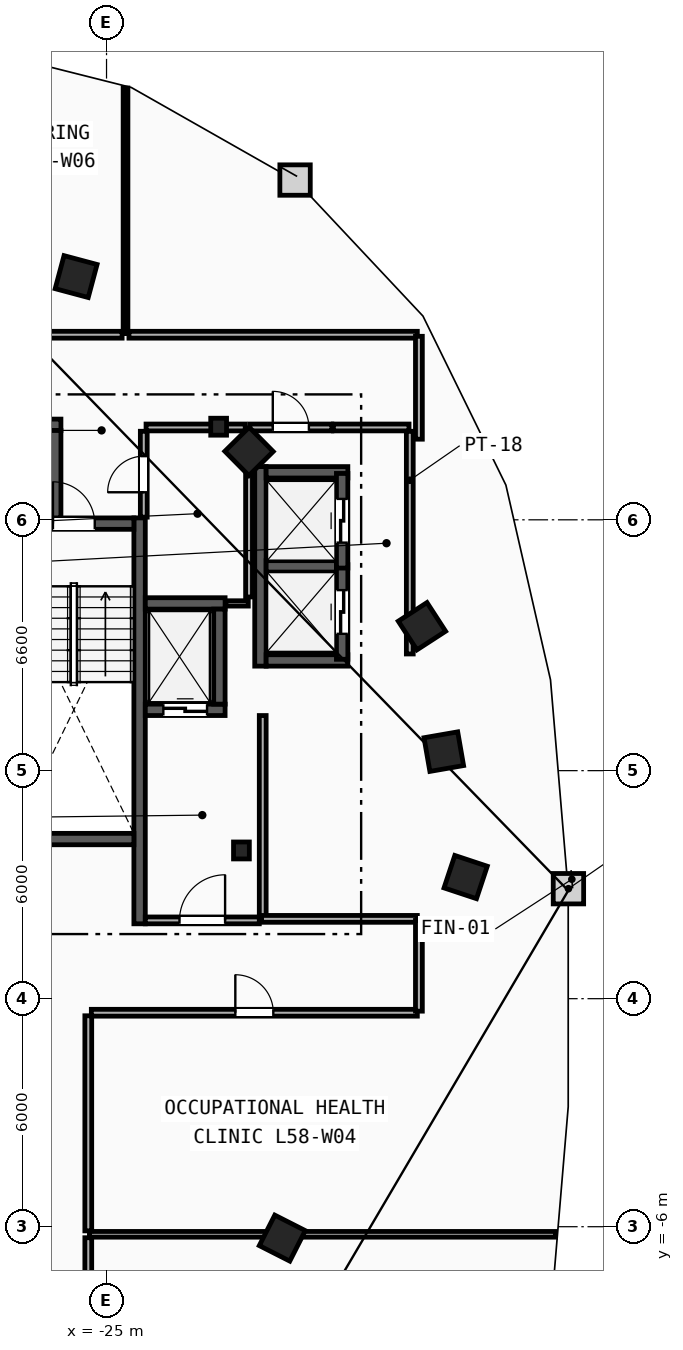
"""IFC4 building model, lengths in metres.
Left out: names, types, materials, properties, quantities, classifications, styles, units other than length and angle.
Written with IfcOpenShell. Run it as: python <this file> out.ifc"""

import sys

from ifc_helpers import new_model, si_unit, direction, frame, frame_2d, origin, origin_2d, place, context, subcontext, project, spatial, rectangle, i_section, extrude, element, fill, save


model = new_model("IFC4")
c1 = context("Model", 3, precision=1e-05, world=origin(), true_north=direction((0.0, 1.0)))
c2 = subcontext(c1, "Body", "Model", "MODEL_VIEW")
j1 = project(units=[si_unit("LENGTHUNIT", "METRE"), si_unit("PLANEANGLEUNIT", "RADIAN")], contexts=[c1])
p1 = place(None, origin())
s1 = spatial("IfcSite", under=j1, at=p1, CompositionType="ELEMENT")
p2 = place(p1, origin())
s2 = spatial("IfcBuilding", under=s1, at=p2, CompositionType="ELEMENT")
p3 = place(p2, frame((0.0, 0.0, 220.6)))
s3 = spatial("IfcBuildingStorey", under=s2, at=p3, CompositionType="ELEMENT", Elevation=220.6)
for number, where, z_axis, x_axis in (
    (1, (-21.45, 3.9, 0.0), (0.0, 0.0, 1.0), (1.0, 0.0, 0.0)),
    (2, (-22.05, 15.05, 0.0), (0.0, 0.0, 1.0), (1.0, 0.0, 0.0)),
):
    element("IfcColumn", number, at=place(p3, frame(where, z_axis=z_axis, x_axis=x_axis)), inside=s3, PredefinedType="COLUMN", context=c2, shape_type="SweptSolid", body=[
        extrude(i_section(OverallWidth=0.416, OverallDepth=0.446, WebThickness=0.039, FlangeThickness=0.063, FilletRadius=0.018, at=origin_2d()), origin(), (0.0, 0.0, 1.0), 3.6),
    ])
for number, where, z_axis, x_axis in (
    (3, (-15.55, 3.2, 0.0), (0.0, 0.0, 1.0), (0.315, 0.949, 0.0)),
    (4, (-16.125, 6.5, 0.0), (0.0, 0.0, 1.0), (-0.172, 0.985, 0.0)),
    (5, (-16.7, 9.8, 0.0), (0.0, 0.0, 1.0), (-0.544, 0.839, 0.0)),
    (6, (-21.25, 14.4, 0.0), (0.0, 0.0, 1.0), (-0.703, 0.711, 0.0)),
    (7, (-25.8, 19.0, 0.0), (0.0, 0.0, 1.0), (-0.966, 0.259, 0.0)),
    (8, (-20.375, -6.3, 0.0), (0.0, 0.0, 1.0), (0.453, 0.892, 0.0)),
):
    element("IfcColumn", number, at=place(p3, frame(where, z_axis=z_axis, x_axis=x_axis)), inside=s3, PredefinedType="COLUMN", context=c2, shape_type="SweptSolid", body=[
        extrude(rectangle(XDim=0.9, YDim=0.9, at=origin_2d()), origin(), (0.0, 0.0, 1.0), 3.6),
    ])
p4 = place(p3, frame((-24.13, 1.97, 0.0), z_axis=(0.0, 0.0, 1.0), x_axis=(0.0, 1.0, 0.0)))
e9 = element("IfcWall", 9, at=p4, inside=s3, PredefinedType="SHEAR", context=c2, shape_type="SweptSolid", body=[
    extrude(rectangle(XDim=10.68, YDim=0.3, at=frame_2d((5.34, 0.0))), origin(), (0.0, 0.0, 1.0), 3.34),
])
p5 = place(p3, frame((-27.44, 12.5, 0.0), z_axis=(0.0, 0.0, 1.0), x_axis=(1.0, 0.0, 0.0)))
e10 = element("IfcWall", 10, at=p5, inside=s3, PredefinedType="SHEAR", context=c2, shape_type="SweptSolid", body=[
    extrude(rectangle(XDim=3.16, YDim=0.3, at=frame_2d((1.58, 0.0))), origin(), (0.0, 0.0, 1.0), 3.34),
])
p6 = place(p5, frame((1.03, 0.0, 0.0)))
e11 = element("IfcOpeningElement", 11, at=p6, cuts=e10, PredefinedType="OPENING", context=c2, shape_type="SweptSolid", body=[
    extrude(rectangle(XDim=1.1, YDim=2.15, at=frame_2d((0.55, 1.075))), frame((0.0, 0.16, 0.0), z_axis=(0.0, -1.0, 0.0), x_axis=(1.0, 0.0, 0.0)), (0.0, 0.0, 1.0), 0.32),
])
p7 = place(p3, frame((-27.44, 4.2, 0.0), z_axis=(0.0, 0.0, 1.0), x_axis=(1.0, 0.0, 0.0)))
e12 = element("IfcWall", 12, at=p7, inside=s3, PredefinedType="SHEAR", context=c2, shape_type="SweptSolid", body=[
    extrude(rectangle(XDim=3.16, YDim=0.3, at=frame_2d((1.58, 0.0))), origin(), (0.0, 0.0, 1.0), 3.34),
])
p8 = place(p3, frame((-20.89, 2.15, 0.0), z_axis=(0.0, 0.0, 1.0), x_axis=(0.0, 1.0, 0.0)))
e13 = element("IfcWall", 13, at=p8, inside=s3, PredefinedType="PARTITIONING", context=c2, shape_type="SweptSolid", body=[
    extrude(rectangle(XDim=5.3, YDim=0.18, at=frame_2d((2.65, 0.0))), origin(), (0.0, 0.0, 1.0), 3.34),
])
p9 = place(p3, frame((-23.98, 2.06, 0.0), z_axis=(0.0, 0.0, 1.0), x_axis=(1.0, 0.0, 0.0)))
e14 = element("IfcWall", 14, at=p9, inside=s3, PredefinedType="PARTITIONING", context=c2, shape_type="SweptSolid", body=[
    extrude(rectangle(XDim=3.0, YDim=0.18, at=frame_2d((1.5, 0.0))), origin(), (0.0, 0.0, 1.0), 3.34),
])
p10 = place(p9, frame((0.9, 0.0, 0.0)))
e15 = element("IfcOpeningElement", 15, at=p10, cuts=e14, PredefinedType="OPENING", context=c2, shape_type="SweptSolid", body=[
    extrude(rectangle(XDim=1.2, YDim=2.15, at=frame_2d((0.6, 1.075))), frame((0.0, 0.1, 0.0), z_axis=(0.0, -1.0, 0.0), x_axis=(1.0, 0.0, 0.0)), (0.0, 0.0, 1.0), 0.2),
])
p11 = place(p3, frame((-23.98, 7.6, 0.0), z_axis=(0.0, 0.0, 1.0), x_axis=(1.0, 0.0, 0.0)))
e16 = element("IfcWall", 16, at=p11, inside=s3, PredefinedType="SHEAR", context=c2, shape_type="SweptSolid", body=[
    extrude(rectangle(XDim=2.1, YDim=0.3, at=frame_2d((1.05, 0.0))), origin(), (0.0, 0.0, 1.0), 3.34),
])
p12 = place(p11, frame((0.475, 0.0, 0.0)))
e17 = element("IfcOpeningElement", 17, at=p12, cuts=e16, PredefinedType="OPENING", context=c2, shape_type="SweptSolid", body=[
    extrude(rectangle(XDim=1.15, YDim=2.2, at=frame_2d((0.575, 1.1))), frame((0.0, 0.16, 0.0), z_axis=(0.0, -1.0, 0.0), x_axis=(1.0, 0.0, 0.0)), (0.0, 0.0, 1.0), 0.32),
])
p13 = place(p3, frame((-23.98, 10.4, 0.0), z_axis=(0.0, 0.0, 1.0), x_axis=(1.0, 0.0, 0.0)))
e18 = element("IfcWall", 18, at=p13, inside=s3, PredefinedType="SHEAR", context=c2, shape_type="SweptSolid", body=[
    extrude(rectangle(XDim=2.1, YDim=0.3, at=frame_2d((1.05, 0.0))), origin(), (0.0, 0.0, 1.0), 3.34),
])
for number, where, z_axis, x_axis in (
    (19, (-22.03, 7.75, 0.0), (0.0, 0.0, 1.0), (0.0, 1.0, 0.0)),
    (20, (-28.7, 15.1, 0.0), (0.0, 0.0, 1.0), (1.0, 0.0, 0.0)),
):
    element("IfcWall", number, at=place(p3, frame(where, z_axis=z_axis, x_axis=x_axis)), inside=s3, PredefinedType="SHEAR", context=c2, shape_type="SweptSolid", body=[
        extrude(rectangle(XDim=2.5, YDim=0.3, at=frame_2d((1.25, 0.0))), origin(), (0.0, 0.0, 1.0), 3.34),
    ])
p14 = place(p3, frame((-26.35, 12.65, 0.0), z_axis=(0.0, 0.0, 1.0), x_axis=(0.0, 1.0, 0.0)))
e21 = element("IfcWall", 21, at=p14, inside=s3, PredefinedType="SHEAR", context=c2, shape_type="SweptSolid", body=[
    extrude(rectangle(XDim=2.3, YDim=0.3, at=frame_2d((1.15, 0.0))), origin(), (0.0, 0.0, 1.0), 3.34),
])
p15 = place(p3, frame((-20.95, 8.75, 0.0), z_axis=(0.0, 0.0, 1.0), x_axis=(0.0, 1.0, 0.0)))
e22 = element("IfcWall", 22, at=p15, inside=s3, PredefinedType="SHEAR", context=c2, shape_type="SweptSolid", body=[
    extrude(rectangle(XDim=5.25, YDim=0.3, at=frame_2d((2.625, 0.0))), origin(), (0.0, 0.0, 1.0), 3.34),
])
for number, where, z_axis, x_axis in (
    (23, (-20.8, 8.9, 0.0), (0.0, 0.0, 1.0), (1.0, 0.0, 0.0)),
    (24, (-20.8, 13.85, 0.0), (0.0, 0.0, 1.0), (1.0, 0.0, 0.0)),
):
    element("IfcWall", number, at=place(p3, frame(where, z_axis=z_axis, x_axis=x_axis)), inside=s3, PredefinedType="SHEAR", context=c2, shape_type="SweptSolid", body=[
        extrude(rectangle(XDim=2.15, YDim=0.3, at=frame_2d((1.075, 0.0))), origin(), (0.0, 0.0, 1.0), 3.34),
    ])
p16 = place(p3, frame((-20.8, 11.375, 0.0), z_axis=(0.0, 0.0, 1.0), x_axis=(1.0, 0.0, 0.0)))
e25 = element("IfcWall", 25, at=p16, inside=s3, PredefinedType="SHEAR", context=c2, shape_type="SweptSolid", body=[
    extrude(rectangle(XDim=1.85, YDim=0.3, at=frame_2d((0.925, 0.0))), origin(), (0.0, 0.0, 1.0), 3.34),
])
p17 = place(p3, frame((-18.8, 8.93, 0.0), z_axis=(0.0, 0.0, 1.0), x_axis=(0.0, 1.0, 0.0)))
e26 = element("IfcWall", 26, at=p17, inside=s3, PredefinedType="SHEAR", context=c2, shape_type="SweptSolid", body=[
    extrude(rectangle(XDim=2.49, YDim=0.3, at=frame_2d((1.245, 0.0))), origin(), (0.0, 0.0, 1.0), 3.34),
])
p18 = place(p17, frame((0.67, 0.0, 0.0)))
e27 = element("IfcOpeningElement", 27, at=p18, cuts=e26, PredefinedType="OPENING", context=c2, shape_type="SweptSolid", body=[
    extrude(rectangle(XDim=1.15, YDim=2.2, at=frame_2d((0.575, 1.1))), frame((0.0, 0.16, 0.0), z_axis=(0.0, -1.0, 0.0), x_axis=(1.0, 0.0, 0.0)), (0.0, 0.0, 1.0), 0.32),
])
p19 = place(p3, frame((-18.8, 11.33, 0.0), z_axis=(0.0, 0.0, 1.0), x_axis=(0.0, 1.0, 0.0)))
e28 = element("IfcWall", 28, at=p19, inside=s3, PredefinedType="SHEAR", context=c2, shape_type="SweptSolid", body=[
    extrude(rectangle(XDim=2.49, YDim=0.3, at=frame_2d((1.245, 0.0))), origin(), (0.0, 0.0, 1.0), 3.34),
])
p20 = place(p19, frame((0.67, 0.0, 0.0)))
e29 = element("IfcOpeningElement", 29, at=p20, cuts=e28, PredefinedType="OPENING", context=c2, shape_type="SweptSolid", body=[
    extrude(rectangle(XDim=1.15, YDim=2.2, at=frame_2d((0.575, 1.1))), frame((0.0, 0.16, 0.0), z_axis=(0.0, -1.0, 0.0), x_axis=(1.0, 0.0, 0.0)), (0.0, 0.0, 1.0), 0.32),
])
p21 = place(p3, frame((-17.02, 9.07, 0.0), z_axis=(0.0, 0.0, 1.0), x_axis=(0.0, 1.0, 0.0)))
e30 = element("IfcWall", 30, at=p21, inside=s3, PredefinedType="PARTITIONING", context=c2, shape_type="SweptSolid", body=[
    extrude(rectangle(XDim=5.86, YDim=0.18, at=frame_2d((2.93, 0.0))), origin(), (0.0, 0.0, 1.0), 3.34),
])
p22 = place(p3, frame((-21.23, 15.03, 0.0), z_axis=(0.0, 0.0, 1.0), x_axis=(1.0, 0.0, 0.0)))
e31 = element("IfcWall", 31, at=p22, inside=s3, PredefinedType="PARTITIONING", context=c2, shape_type="SweptSolid", body=[
    extrude(rectangle(XDim=2.16, YDim=0.18, at=frame_2d((1.08, 0.0))), origin(), (0.0, 0.0, 1.0), 3.34),
])
p23 = place(p22, frame((0.605, 0.0, 0.0)))
e32 = element("IfcOpeningElement", 32, at=p23, cuts=e31, PredefinedType="OPENING", context=c2, shape_type="SweptSolid", body=[
    extrude(rectangle(XDim=0.95, YDim=2.1, at=frame_2d((0.475, 1.05))), frame((0.0, 0.1, 0.0), z_axis=(0.0, -1.0, 0.0), x_axis=(1.0, 0.0, 0.0)), (0.0, 0.0, 1.0), 0.2),
])
p24 = place(p3, frame((-19.03, 15.03, 0.0), z_axis=(0.0, 0.0, 1.0), x_axis=(1.0, 0.0, 0.0)))
e33 = element("IfcWall", 33, at=p24, inside=s3, PredefinedType="PARTITIONING", context=c2, shape_type="SweptSolid", body=[
    extrude(rectangle(XDim=1.99, YDim=0.18, at=frame_2d((0.995, 0.0))), origin(), (0.0, 0.0, 1.0), 3.34),
])
p25 = place(p3, frame((-21.86, 10.4, 0.0), z_axis=(0.0, 0.0, 1.0), x_axis=(1.0, 0.0, 0.0)))
e34 = element("IfcWall", 34, at=p25, inside=s3, PredefinedType="PARTITIONING", context=c2, shape_type="SweptSolid", body=[
    extrude(rectangle(XDim=0.59, YDim=0.14, at=frame_2d((0.295, 0.0))), origin(), (0.0, 0.0, 1.0), 3.34),
])
p26 = place(p3, frame((-21.25, 10.57, 0.0), z_axis=(0.0, 0.0, 1.0), x_axis=(0.0, 1.0, 0.0)))
e35 = element("IfcWall", 35, at=p26, inside=s3, PredefinedType="PARTITIONING", context=c2, shape_type="SweptSolid", body=[
    extrude(rectangle(XDim=4.36, YDim=0.18, at=frame_2d((2.18, 0.0))), origin(), (0.0, 0.0, 1.0), 3.34),
])
p27 = place(p3, frame((-23.96, 15.03, 0.0), z_axis=(0.0, 0.0, 1.0), x_axis=(1.0, 0.0, 0.0)))
e36 = element("IfcWall", 36, at=p27, inside=s3, PredefinedType="PARTITIONING", context=c2, shape_type="SweptSolid", body=[
    extrude(rectangle(XDim=2.61, YDim=0.18, at=frame_2d((1.305, 0.0))), origin(), (0.0, 0.0, 1.0), 2.413),
])
p28 = place(p3, frame((-24.02, 12.67, 0.0), z_axis=(0.0, 0.0, 1.0), x_axis=(0.0, 1.0, 0.0)))
e37 = element("IfcWall", 37, at=p28, inside=s3, PredefinedType="PARTITIONING", context=c2, shape_type="SweptSolid", body=[
    extrude(rectangle(XDim=2.26, YDim=0.18, at=frame_2d((1.13, 0.0))), origin(), (0.0, 0.0, 1.0), 3.34),
])
p29 = place(p28, frame((0.655, 0.0, 0.0)))
e38 = element("IfcOpeningElement", 38, at=p29, cuts=e37, PredefinedType="OPENING", context=c2, shape_type="SweptSolid", body=[
    extrude(rectangle(XDim=0.95, YDim=2.1, at=frame_2d((0.475, 1.05))), frame((0.0, 0.1, 0.0), z_axis=(0.0, -1.0, 0.0), x_axis=(1.0, 0.0, 0.0)), (0.0, 0.0, 1.0), 0.2),
])
p30 = place(p3, frame((-25.45, -6.2, 0.0), z_axis=(0.0, 0.0, 1.0), x_axis=(1.0, 0.0, 0.0)))
e39 = element("IfcWall", 39, at=p30, inside=s3, PredefinedType="PARTITIONING", context=c2, shape_type="SweptSolid", body=[
    extrude(rectangle(XDim=12.267, YDim=0.15, at=frame_2d((6.133, 0.0))), origin(), (0.0, 0.0, 1.0), 3.34),
])
p31 = place(p3, frame((-24.5, 17.5, 0.0), z_axis=(0.0, 0.0, 1.0), x_axis=(0.0, 1.0, 0.0)))
e40 = element("IfcWall", 40, at=p31, inside=s3, PredefinedType="PARTITIONING", context=c2, shape_type="SweptSolid", body=[
    extrude(rectangle(XDim=6.463, YDim=0.125, at=frame_2d((3.231, 0.0))), origin(), (0.0, 0.0, 1.0), 3.34),
])
p32 = place(p3, frame((-25.48, -11.178, 0.0), z_axis=(0.0, 0.0, 1.0), x_axis=(0.0, 1.0, 0.0)))
e41 = element("IfcWall", 41, at=p32, inside=s3, PredefinedType="PARTITIONING", context=c2, shape_type="SweptSolid", body=[
    extrude(rectangle(XDim=4.888, YDim=0.18, at=frame_2d((2.444, 0.0))), origin(), (0.0, 0.0, 1.0), 3.34),
])
p33 = place(p3, frame((-25.4, -0.37, 0.0), z_axis=(0.0, 0.0, 1.0), x_axis=(1.0, 0.0, 0.0)))
e42 = element("IfcWall", 42, at=p33, inside=s3, PredefinedType="PARTITIONING", context=c2, shape_type="SweptSolid", body=[
    extrude(rectangle(XDim=8.578, YDim=0.18, at=frame_2d((4.289, 0.0))), origin(), (0.0, 0.0, 1.0), 3.34),
])
p34 = place(p33, frame((3.789, 0.0, 0.0)))
e43 = element("IfcOpeningElement", 43, at=p34, cuts=e42, PredefinedType="OPENING", context=c2, shape_type="SweptSolid", body=[
    extrude(rectangle(XDim=1.0, YDim=2.15, at=frame_2d((0.5, 1.075))), frame((0.0, 0.1, 0.0), z_axis=(0.0, -1.0, 0.0), x_axis=(1.0, 0.0, 0.0)), (0.0, 0.0, 1.0), 0.2),
])
p35 = place(p3, frame((-16.822, 17.47, 0.0), z_axis=(0.0, 0.0, 1.0), x_axis=(-1.0, 0.0, 0.0)))
e44 = element("IfcWall", 44, at=p35, inside=s3, PredefinedType="PARTITIONING", context=c2, shape_type="SweptSolid", body=[
    extrude(rectangle(XDim=7.588, YDim=0.18, at=frame_2d((3.794, 0.0))), origin(), (0.0, 0.0, 1.0), 3.34),
])
p36 = place(p3, frame((-25.48, -6.11, 0.0), z_axis=(0.0, 0.0, 1.0), x_axis=(0.0, 1.0, 0.0)))
e45 = element("IfcWall", 45, at=p36, inside=s3, PredefinedType="PARTITIONING", context=c2, shape_type="SweptSolid", body=[
    extrude(rectangle(XDim=5.66, YDim=0.18, at=frame_2d((2.83, 0.0))), origin(), (0.0, 0.0, 1.0), 3.34),
])
p37 = place(p3, frame((-16.822, 2.1, 0.0), z_axis=(0.0, 0.0, 1.0), x_axis=(-1.0, 0.0, 0.0)))
e46 = element("IfcWall", 46, at=p37, inside=s3, PredefinedType="PARTITIONING", context=c2, shape_type="SweptSolid", body=[
    extrude(rectangle(XDim=4.098, YDim=0.18, at=frame_2d((2.049, 0.0))), origin(), (0.0, 0.0, 1.0), 3.34),
])
p38 = place(p3, frame((-16.78, 14.721, 0.0), z_axis=(0.0, 0.0, 1.0), x_axis=(0.0, 1.0, 0.0)))
e47 = element("IfcWall", 47, at=p38, inside=s3, PredefinedType="PARTITIONING", context=c2, shape_type="SweptSolid", body=[
    extrude(rectangle(XDim=2.707, YDim=0.18, at=frame_2d((1.354, 0.0))), origin(), (0.0, 0.0, 1.0), 3.34),
])
p39 = place(p3, frame((-16.78, -0.329, 0.0), z_axis=(0.0, 0.0, 1.0), x_axis=(0.0, 1.0, 0.0)))
e48 = element("IfcWall", 48, at=p39, inside=s3, PredefinedType="PARTITIONING", context=c2, shape_type="SweptSolid", body=[
    extrude(rectangle(XDim=2.387, YDim=0.18, at=frame_2d((1.194, 0.0))), origin(), (0.0, 0.0, 1.0), 3.34),
])
p40 = place(p3, frame((-24.59, 17.47, 0.0), z_axis=(0.0, 0.0, 1.0), x_axis=(-1.0, 0.0, 0.0)))
e49 = element("IfcWall", 49, at=p40, inside=s3, PredefinedType="PARTITIONING", context=c2, shape_type="SweptSolid", body=[
    extrude(rectangle(XDim=6.82, YDim=0.18, at=frame_2d((3.41, 0.0))), origin(), (0.0, 0.0, 1.0), 3.34),
])
p41 = place(p40, frame((2.91, 0.0, 0.0)))
e50 = element("IfcOpeningElement", 50, at=p41, cuts=e49, PredefinedType="OPENING", context=c2, shape_type="SweptSolid", body=[
    extrude(rectangle(XDim=1.0, YDim=2.15, at=frame_2d((0.5, 1.075))), frame((0.0, 0.1, 0.0), z_axis=(0.0, -1.0, 0.0), x_axis=(1.0, 0.0, 0.0)), (0.0, 0.0, 1.0), 0.2),
])
p42 = place(p6, origin())
e51 = element("IfcDoor", 51, at=p42, inside=s3, OperationType="SINGLE_SWING_LEFT", PredefinedType="DOOR", context=c2, shape_type="SweptSolid", body=[
    extrude(rectangle(XDim=1.1, YDim=2.15, at=frame_2d((0.55, 1.075))), frame((0.0, 0.025, 0.0), z_axis=(0.0, -1.0, 0.0), x_axis=(1.0, 0.0, 0.0)), (0.0, 0.0, 1.0), 0.05),
])
fill(e11, e51)
p43 = place(p10, origin())
e52 = element("IfcDoor", 52, at=p43, inside=s3, OperationType="SINGLE_SWING_RIGHT", PredefinedType="DOOR", context=c2, shape_type="SweptSolid", body=[
    extrude(rectangle(XDim=1.2, YDim=2.15, at=frame_2d((0.6, 1.075))), frame((0.0, 0.025, 0.0), z_axis=(0.0, -1.0, 0.0), x_axis=(1.0, 0.0, 0.0)), (0.0, 0.0, 1.0), 0.05),
])
fill(e15, e52)
p44 = place(p12, origin())
e53 = element("IfcDoor", 53, at=p44, inside=s3, OperationType="SLIDING_TO_LEFT", PredefinedType="TRAPDOOR", context=c2, shape_type="SweptSolid", body=[
    extrude(rectangle(XDim=1.15, YDim=2.2, at=frame_2d((0.575, 1.1))), frame((0.0, 0.025, 0.0), z_axis=(0.0, -1.0, 0.0), x_axis=(1.0, 0.0, 0.0)), (0.0, 0.0, 1.0), 0.05),
])
fill(e17, e53)
p45 = place(p18, origin())
e54 = element("IfcDoor", 54, at=p45, inside=s3, OperationType="SLIDING_TO_LEFT", PredefinedType="TRAPDOOR", context=c2, shape_type="SweptSolid", body=[
    extrude(rectangle(XDim=1.15, YDim=2.2, at=frame_2d((0.575, 1.1))), frame((0.0, 0.025, 0.0), z_axis=(0.0, -1.0, 0.0), x_axis=(1.0, 0.0, 0.0)), (0.0, 0.0, 1.0), 0.05),
])
fill(e27, e54)
p46 = place(p20, origin())
e55 = element("IfcDoor", 55, at=p46, inside=s3, OperationType="SLIDING_TO_LEFT", PredefinedType="TRAPDOOR", context=c2, shape_type="SweptSolid", body=[
    extrude(rectangle(XDim=1.15, YDim=2.2, at=frame_2d((0.575, 1.1))), frame((0.0, 0.025, 0.0), z_axis=(0.0, -1.0, 0.0), x_axis=(1.0, 0.0, 0.0)), (0.0, 0.0, 1.0), 0.05),
])
fill(e29, e55)
p47 = place(p34, origin())
e56 = element("IfcDoor", 56, at=p47, inside=s3, OperationType="SINGLE_SWING_LEFT", PredefinedType="DOOR", context=c2, shape_type="SweptSolid", body=[
    extrude(rectangle(XDim=1.0, YDim=2.15, at=frame_2d((0.5, 1.075))), frame((0.0, 0.025, 0.0), z_axis=(0.0, -1.0, 0.0), x_axis=(1.0, 0.0, 0.0)), (0.0, 0.0, 1.0), 0.05),
])
fill(e43, e56)
p48 = place(p29, origin())
e57 = element("IfcDoor", 57, at=p48, inside=s3, OperationType="SINGLE_SWING_LEFT", PredefinedType="DOOR", context=c2, shape_type="SweptSolid", body=[
    extrude(rectangle(XDim=0.95, YDim=2.1, at=frame_2d((0.475, 1.05))), frame((0.0, 0.025, 0.0), z_axis=(0.0, -1.0, 0.0), x_axis=(1.0, 0.0, 0.0)), (0.0, 0.0, 1.0), 0.05),
])
fill(e38, e57)
p49 = place(p23, origin())
e58 = element("IfcDoor", 58, at=p49, inside=s3, OperationType="SINGLE_SWING_LEFT", PredefinedType="DOOR", context=c2, shape_type="SweptSolid", body=[
    extrude(rectangle(XDim=0.95, YDim=2.1, at=frame_2d((0.475, 1.05))), frame((0.0, 0.025, 0.0), z_axis=(0.0, -1.0, 0.0), x_axis=(1.0, 0.0, 0.0)), (0.0, 0.0, 1.0), 0.05),
])
fill(e32, e58)
save(model, sys.argv[1])
